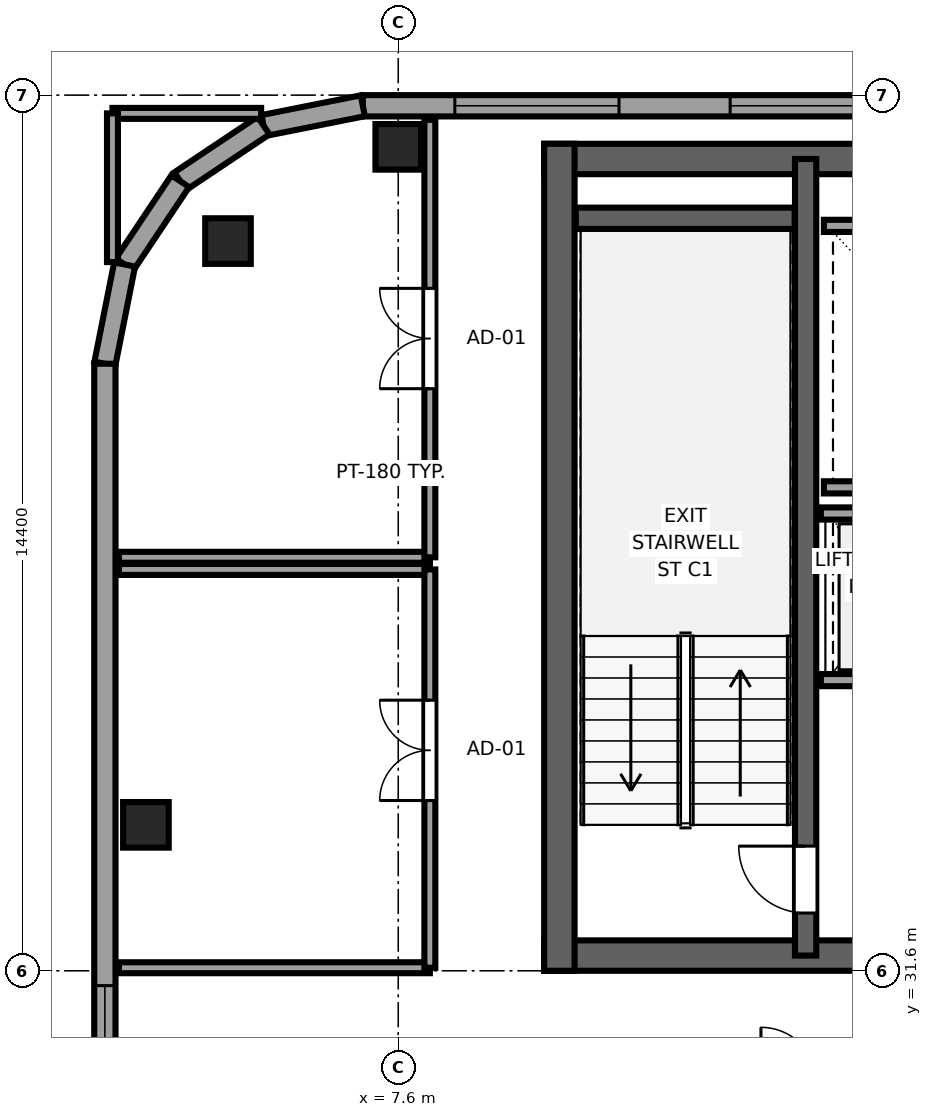
"""IFC4 building model, lengths in metres.
Left out: names, types, materials, properties, quantities, classifications, styles, units other than length and angle.
Written with IfcOpenShell. Run it as: python <this file> out.ifc"""

import sys

from ifc_helpers import new_model, si_unit, direction, frame, frame_2d, origin, origin_2d, place, context, subcontext, project, spatial, rectangle, extrude, source, transform, mapped, element, fill, save


model = new_model("IFC4")
c1 = context("Model", 3, precision=1e-05, world=origin(), true_north=direction((0.0, 1.0)))
c2 = subcontext(c1, "Body", "Model", "MODEL_VIEW")
j1 = project(units=[si_unit("LENGTHUNIT", "METRE"), si_unit("PLANEANGLEUNIT", "RADIAN")], contexts=[c1])
p1 = place(None, origin())
s1 = spatial("IfcSite", under=j1, at=p1, CompositionType="ELEMENT")
p2 = place(p1, origin())
s2 = spatial("IfcBuilding", under=s1, at=p2, CompositionType="ELEMENT")
p3 = place(p2, frame((0.0, 0.0, 209.7)))
s3 = spatial("IfcBuildingStorey", under=s2, at=p3, CompositionType="ELEMENT", Elevation=209.7)
p4 = place(p3, frame((10.0, 31.85, 0.0), z_axis=(0.0, 0.0, 1.0), x_axis=(1.0, 0.0, 0.0)))
e1 = element("IfcWall", 1, at=p4, inside=s3, PredefinedType="SHEAR", context=c2, shape_type="SweptSolid", body=[
    extrude(rectangle(XDim=26.0, YDim=0.5, at=frame_2d((13.0, 0.0))), origin(), (0.0, 0.0, 1.0), 3.55),
])
p5 = place(p4, frame((7.45, 0.0, 0.0), z_axis=(0.0, 0.0, 1.0), x_axis=(-1.0, 0.0, 0.0)))
e2 = element("IfcOpeningElement", 2, at=p5, cuts=e1, PredefinedType="OPENING", context=c2, shape_type="SweptSolid", body=[
    extrude(rectangle(XDim=1.5, YDim=2.04, at=frame_2d((0.75, 1.02))), frame((0.0, 0.26, 0.0), z_axis=(0.0, -1.0, 0.0), x_axis=(1.0, 0.0, 0.0)), (0.0, 0.0, 1.0), 0.52),
])
p6 = place(p4, frame((13.75, 0.0, 0.0), z_axis=(0.0, 0.0, 1.0), x_axis=(-1.0, 0.0, 0.0)))
e3 = element("IfcOpeningElement", 3, at=p6, cuts=e1, PredefinedType="OPENING", context=c2, shape_type="SweptSolid", body=[
    extrude(rectangle(XDim=1.5, YDim=2.04, at=frame_2d((0.75, 1.02))), frame((0.0, 0.26, 0.0), z_axis=(0.0, -1.0, 0.0), x_axis=(1.0, 0.0, 0.0)), (0.0, 0.0, 1.0), 0.52),
])
p7 = place(p4, frame((20.05, 0.0, 0.0), z_axis=(0.0, 0.0, 1.0), x_axis=(-1.0, 0.0, 0.0)))
e4 = element("IfcOpeningElement", 4, at=p7, cuts=e1, PredefinedType="OPENING", context=c2, shape_type="SweptSolid", body=[
    extrude(rectangle(XDim=1.5, YDim=2.04, at=frame_2d((0.75, 1.02))), frame((0.0, 0.26, 0.0), z_axis=(0.0, -1.0, 0.0), x_axis=(1.0, 0.0, 0.0)), (0.0, 0.0, 1.0), 0.52),
])
p8 = place(p3, frame((10.0, 44.95, 0.0), z_axis=(0.0, 0.0, 1.0), x_axis=(1.0, 0.0, 0.0)))
e5 = element("IfcWall", 5, at=p8, inside=s3, PredefinedType="SHEAR", context=c2, shape_type="SweptSolid", body=[
    extrude(rectangle(XDim=26.0, YDim=0.5, at=frame_2d((13.0, 0.0))), origin(), (0.0, 0.0, 1.0), 3.55),
])
p9 = place(p3, frame((10.25, 31.6, 0.0), z_axis=(0.0, 0.0, 1.0), x_axis=(0.0, 1.0, 0.0)))
e6 = element("IfcWall", 6, at=p9, inside=s3, PredefinedType="SHEAR", context=c2, shape_type="SweptSolid", body=[
    extrude(rectangle(XDim=13.6, YDim=0.5, at=frame_2d((6.8, 0.0))), origin(), (0.0, 0.0, 1.0), 3.55),
])
p10 = place(p3, frame((14.3, 31.85, 0.0), z_axis=(0.0, 0.0, 1.0), x_axis=(0.0, 1.0, 0.0)))
e7 = element("IfcWall", 7, at=p10, inside=s3, PredefinedType="SHEAR", context=c2, shape_type="SweptSolid", body=[
    extrude(rectangle(XDim=13.1, YDim=0.35, at=frame_2d((6.55, 0.0))), origin(), (0.0, 0.0, 1.0), 3.55),
])
p11 = place(p10, frame((0.7, 0.0, 0.0)))
e8 = element("IfcOpeningElement", 8, at=p11, cuts=e7, PredefinedType="OPENING", context=c2, shape_type="SweptSolid", body=[
    extrude(rectangle(XDim=1.1, YDim=2.12, at=frame_2d((0.55, 1.06))), frame((0.0, 0.185, 0.0), z_axis=(0.0, -1.0, 0.0), x_axis=(1.0, 0.0, 0.0)), (0.0, 0.0, 1.0), 0.37),
])
p12 = place(p3, frame((10.52, 43.975, 0.0), z_axis=(0.0, 0.0, 1.0), x_axis=(1.0, 0.0, 0.0)))
e9 = element("IfcWall", 9, at=p12, inside=s3, PredefinedType="SHEAR", context=c2, shape_type="SweptSolid", body=[
    extrude(rectangle(XDim=3.6, YDim=0.35, at=frame_2d((1.8, 0.0))), origin(), (0.0, 0.0, 1.0), 3.55),
])
m1 = source(origin(), c2, "Body", "SweptSolid", [
    extrude(rectangle(XDim=0.75, YDim=0.75, at=origin_2d()), origin(), (0.0, 0.0, 1.0), 3.55),
])
for number, where, z_axis, x_axis in (
    (10, (4.8, 43.6, 0.0), (0.0, 0.0, 1.0), (1.0, 0.0, 0.0)),
    (11, (7.6, 45.15, 0.0), (0.0, 0.0, 1.0), (1.0, 0.0, 0.0)),
    (12, (3.45, 34.0, 0.0), (0.0, 0.0, 1.0), (1.0, 0.0, 0.0)),
):
    element("IfcColumn", number, at=place(p3, frame(where, z_axis=z_axis, x_axis=x_axis)), inside=s3, PredefinedType="COLUMN", context=c2, shape_type="MappedRepresentation", body=[
        mapped(m1, transform((0.0, 0.0, 0.0), x_axis=(1.0, 0.0, 0.0), y_axis=(0.0, 1.0, 0.0), z_axis=(0.0, 0.0, 1.0), scale=1.0)),
    ])
p13 = place(p3, frame((35.383, 45.825, 0.0), z_axis=(0.0, 0.0, 1.0), x_axis=(-1.0, 0.0, 0.0)))
e13 = element("IfcWall", 13, at=p13, inside=s3, PredefinedType="SOLIDWALL", context=c2, shape_type="SweptSolid", body=[
    extrude(rectangle(XDim=28.366, YDim=0.35, at=frame_2d((14.183, 0.0))), origin(), (0.0, 0.0, 1.0), 3.37),
])
p14 = place(p13, frame((1.514, 0.0, 0.68)))
e14 = element("IfcOpeningElement", 14, at=p14, cuts=e13, PredefinedType="OPENING", context=c2, shape_type="SweptSolid", body=[
    extrude(rectangle(XDim=2.7, YDim=1.95, at=frame_2d((1.35, 0.975))), frame((0.0, 0.185, 0.0), z_axis=(0.0, -1.0, 0.0), x_axis=(1.0, 0.0, 0.0)), (0.0, 0.0, 1.0), 0.37),
])
p15 = place(p13, frame((6.041, 0.0, 0.68)))
e15 = element("IfcOpeningElement", 15, at=p15, cuts=e13, PredefinedType="OPENING", context=c2, shape_type="SweptSolid", body=[
    extrude(rectangle(XDim=2.7, YDim=1.95, at=frame_2d((1.35, 0.975))), frame((0.0, 0.185, 0.0), z_axis=(0.0, -1.0, 0.0), x_axis=(1.0, 0.0, 0.0)), (0.0, 0.0, 1.0), 0.37),
])
p16 = place(p13, frame((10.569, 0.0, 0.68)))
e16 = element("IfcOpeningElement", 16, at=p16, cuts=e13, PredefinedType="OPENING", context=c2, shape_type="SweptSolid", body=[
    extrude(rectangle(XDim=2.7, YDim=1.95, at=frame_2d((1.35, 0.975))), frame((0.0, 0.185, 0.0), z_axis=(0.0, -1.0, 0.0), x_axis=(1.0, 0.0, 0.0)), (0.0, 0.0, 1.0), 0.37),
])
p17 = place(p13, frame((15.097, 0.0, 0.68)))
e17 = element("IfcOpeningElement", 17, at=p17, cuts=e13, PredefinedType="OPENING", context=c2, shape_type="SweptSolid", body=[
    extrude(rectangle(XDim=2.7, YDim=1.95, at=frame_2d((1.35, 0.975))), frame((0.0, 0.185, 0.0), z_axis=(0.0, -1.0, 0.0), x_axis=(1.0, 0.0, 0.0)), (0.0, 0.0, 1.0), 0.37),
])
p18 = place(p13, frame((19.624, 0.0, 0.68)))
e18 = element("IfcOpeningElement", 18, at=p18, cuts=e13, PredefinedType="OPENING", context=c2, shape_type="SweptSolid", body=[
    extrude(rectangle(XDim=2.7, YDim=1.95, at=frame_2d((1.35, 0.975))), frame((0.0, 0.185, 0.0), z_axis=(0.0, -1.0, 0.0), x_axis=(1.0, 0.0, 0.0)), (0.0, 0.0, 1.0), 0.37),
])
p19 = place(p13, frame((24.152, 0.0, 0.68)))
e19 = element("IfcOpeningElement", 19, at=p19, cuts=e13, PredefinedType="OPENING", context=c2, shape_type="SweptSolid", body=[
    extrude(rectangle(XDim=2.7, YDim=1.95, at=frame_2d((1.35, 0.975))), frame((0.0, 0.185, 0.0), z_axis=(0.0, -1.0, 0.0), x_axis=(1.0, 0.0, 0.0)), (0.0, 0.0, 1.0), 0.37),
])
p20 = place(p3, frame((7.017, 45.825, 0.0), z_axis=(0.0, 0.0, 1.0), x_axis=(-0.980788844421, -0.195072403631, 0.0)))
e20 = element("IfcWall", 20, at=p20, inside=s3, PredefinedType="SOLIDWALL", context=c2, shape_type="SweptSolid", body=[
    extrude(rectangle(XDim=1.665, YDim=0.35, at=frame_2d((0.832, 0.0))), origin(), (0.0, 0.0, 1.0), 3.37),
])
for number, where, z_axis, x_axis in (
    (21, (5.385, 45.5, 0.0), (0.0, 0.0, 1.0), (-0.832, -0.556, 0.0)),
    (22, (4.015, 44.585, 0.0), (0.0, 0.0, 1.0), (-0.556, -0.831, 0.0)),
):
    element("IfcWall", number, at=place(p3, frame(where, z_axis=z_axis, x_axis=x_axis)), inside=s3, PredefinedType="SOLIDWALL", context=c2, shape_type="SweptSolid", body=[
        extrude(rectangle(XDim=1.647, YDim=0.35, at=frame_2d((0.824, 0.0))), origin(), (0.0, 0.0, 1.0), 2.9),
    ])
p21 = place(p3, frame((3.1, 43.216, 0.0), z_axis=(0.0, 0.0, 1.0), x_axis=(-0.195044345786, -0.980794424524, 0.0)))
e23 = element("IfcWall", 23, at=p21, inside=s3, PredefinedType="SOLIDWALL", context=c2, shape_type="SweptSolid", body=[
    extrude(rectangle(XDim=1.665, YDim=0.35, at=frame_2d((0.833, 0.0))), origin(), (0.0, 0.0, 1.0), 3.37),
])
p22 = place(p3, frame((2.775, 41.583, 0.0), z_axis=(0.0, 0.0, 1.0), x_axis=(0.0, -1.0, 0.0)))
e24 = element("IfcWall", 24, at=p22, inside=s3, PredefinedType="SOLIDWALL", context=c2, shape_type="SweptSolid", body=[
    extrude(rectangle(XDim=34.566, YDim=0.35, at=frame_2d((17.283, 0.0))), origin(), (0.0, 0.0, 1.0), 3.37),
])
p23 = place(p22, frame((10.227, 0.0, 0.68)))
e25 = element("IfcOpeningElement", 25, at=p23, cuts=e24, PredefinedType="OPENING", context=c2, shape_type="SweptSolid", body=[
    extrude(rectangle(XDim=2.7, YDim=1.95, at=frame_2d((1.35, 0.975))), frame((0.0, 0.185, 0.0), z_axis=(0.0, -1.0, 0.0), x_axis=(1.0, 0.0, 0.0)), (0.0, 0.0, 1.0), 0.37),
])
p24 = place(p22, frame((22.189, 0.0, 0.68)))
e26 = element("IfcOpeningElement", 26, at=p24, cuts=e24, PredefinedType="OPENING", context=c2, shape_type="SweptSolid", body=[
    extrude(rectangle(XDim=2.7, YDim=1.95, at=frame_2d((1.35, 0.975))), frame((0.0, 0.185, 0.0), z_axis=(0.0, -1.0, 0.0), x_axis=(1.0, 0.0, 0.0)), (0.0, 0.0, 1.0), 0.37),
])
p25 = place(p22, frame((26.36, 0.0, 0.68)))
e27 = element("IfcOpeningElement", 27, at=p25, cuts=e24, PredefinedType="OPENING", context=c2, shape_type="SweptSolid", body=[
    extrude(rectangle(XDim=2.7, YDim=1.95, at=frame_2d((1.35, 0.975))), frame((0.0, 0.185, 0.0), z_axis=(0.0, -1.0, 0.0), x_axis=(1.0, 0.0, 0.0)), (0.0, 0.0, 1.0), 0.37),
])
p26 = place(p22, frame((29.48, 0.0, 0.68)))
e28 = element("IfcOpeningElement", 28, at=p26, cuts=e24, PredefinedType="OPENING", context=c2, shape_type="SweptSolid", body=[
    extrude(rectangle(XDim=2.7, YDim=1.95, at=frame_2d((1.35, 0.975))), frame((0.0, 0.185, 0.0), z_axis=(0.0, -1.0, 0.0), x_axis=(1.0, 0.0, 0.0)), (0.0, 0.0, 1.0), 0.37),
])
p27 = place(p22, frame((16.683, 0.0, 0.62)))
e29 = element("IfcOpeningElement", 29, at=p27, cuts=e24, PredefinedType="OPENING", context=c2, shape_type="SweptSolid", body=[
    extrude(rectangle(XDim=1.5, YDim=1.55, at=frame_2d((0.75, 0.775))), frame((0.0, 0.185, 0.0), z_axis=(0.0, -1.0, 0.0), x_axis=(1.0, 0.0, 0.0)), (0.0, 0.0, 1.0), 0.37),
])
for number, where, z_axis, x_axis in (
    (30, (14.6, 39.55, 0.0), (0.0, 0.0, 1.0), (1.0, 0.0, 0.0)),
    (31, (14.6, 43.85, 0.0), (0.0, 0.0, 1.0), (1.0, 0.0, 0.0)),
):
    element("IfcWall", number, at=place(p3, frame(where, z_axis=z_axis, x_axis=x_axis)), inside=s3, PredefinedType="SOLIDWALL", context=c2, shape_type="SweptSolid", body=[
        extrude(rectangle(XDim=4.1, YDim=0.2, at=frame_2d((2.05, 0.0))), origin(), (0.0, 0.0, 1.0), 3.37),
    ])
p28 = place(p3, frame((14.55, 36.38, 0.0), z_axis=(0.0, 0.0, 1.0), x_axis=(1.0, 0.0, 0.0)))
e32 = element("IfcWall", 32, at=p28, inside=s3, PredefinedType="SOLIDWALL", context=c2, shape_type="SweptSolid", body=[
    extrude(rectangle(XDim=4.075, YDim=0.2, at=frame_2d((2.038, 0.0))), origin(), (0.0, 0.0, 1.0), 3.37),
])
p29 = place(p28, frame((0.55, 0.0, 0.0)))
e33 = element("IfcOpeningElement", 33, at=p29, cuts=e32, PredefinedType="OPENING", context=c2, shape_type="SweptSolid", body=[
    extrude(rectangle(XDim=1.1, YDim=2.12, at=frame_2d((0.55, 1.06))), frame((0.0, 0.11, 0.0), z_axis=(0.0, -1.0, 0.0), x_axis=(1.0, 0.0, 0.0)), (0.0, 0.0, 1.0), 0.22),
])
p30 = place(p28, frame((2.45, 0.0, 0.0)))
e34 = element("IfcOpeningElement", 34, at=p30, cuts=e32, PredefinedType="OPENING", context=c2, shape_type="SweptSolid", body=[
    extrude(rectangle(XDim=1.1, YDim=2.12, at=frame_2d((0.55, 1.06))), frame((0.0, 0.11, 0.0), z_axis=(0.0, -1.0, 0.0), x_axis=(1.0, 0.0, 0.0)), (0.0, 0.0, 1.0), 0.22),
])
p31 = place(p3, frame((14.55, 39.12, 0.0), z_axis=(0.0, 0.0, 1.0), x_axis=(1.0, 0.0, 0.0)))
e35 = element("IfcWall", 35, at=p31, inside=s3, PredefinedType="SOLIDWALL", context=c2, shape_type="SweptSolid", body=[
    extrude(rectangle(XDim=4.075, YDim=0.2, at=frame_2d((2.038, 0.0))), origin(), (0.0, 0.0, 1.0), 3.37),
])
for number, where, z_axis, x_axis in (
    (36, (3.005, 31.65, 0.0), (0.0, 0.0, 1.0), (1.0, 0.0, 0.0)),
    (37, (3.005, 38.2, 0.0), (0.0, 0.0, 1.0), (1.0, 0.0, 0.0)),
):
    element("IfcWall", number, at=place(p3, frame(where, z_axis=z_axis, x_axis=x_axis)), inside=s3, PredefinedType="PARTITIONING", context=c2, shape_type="SweptSolid", body=[
        extrude(rectangle(XDim=5.115, YDim=0.18, at=frame_2d((2.558, 0.0))), origin(), (0.0, 0.0, 1.0), 3.37),
    ])
p32 = place(p3, frame((8.12, 31.65, 0.0), z_axis=(0.0, 0.0, 1.0), x_axis=(0.0, 1.0, 0.0)))
e38 = element("IfcWall", 38, at=p32, inside=s3, PredefinedType="PARTITIONING", context=c2, shape_type="SweptSolid", body=[
    extrude(rectangle(XDim=6.55, YDim=0.18, at=frame_2d((3.275, 0.0))), origin(), (0.0, 0.0, 1.0), 3.37),
])
p33 = place(p32, frame((2.75, 0.0, 0.0)))
e39 = element("IfcOpeningElement", 39, at=p33, cuts=e38, PredefinedType="OPENING", context=c2, shape_type="SweptSolid", body=[
    extrude(rectangle(XDim=1.65, YDim=2.15, at=frame_2d((0.825, 1.075))), frame((0.0, 0.1, 0.0), z_axis=(0.0, -1.0, 0.0), x_axis=(1.0, 0.0, 0.0)), (0.0, 0.0, 1.0), 0.2),
])
p34 = place(p3, frame((3.005, 38.4, 0.0), z_axis=(0.0, 0.0, 1.0), x_axis=(1.0, 0.0, 0.0)))
e40 = element("IfcWall", 40, at=p34, inside=s3, PredefinedType="PARTITIONING", context=c2, shape_type="SweptSolid", body=[
    extrude(rectangle(XDim=5.115, YDim=0.18, at=frame_2d((2.558, 0.0))), origin(), (0.0, 0.0, 1.0), 3.37),
])
for number, where, z_axis, x_axis in (
    (41, (2.9, 45.7, 0.0), (0.0, 0.0, 1.0), (1.0, 0.0, 0.0)),
    (42, (2.9, 43.255, 0.0), (0.0, 0.0, 1.0), (0.0, 1.0, 0.0)),
):
    element("IfcWall", number, at=place(p3, frame(where, z_axis=z_axis, x_axis=x_axis)), inside=s3, PredefinedType="PARTITIONING", context=c2, shape_type="SweptSolid", body=[
        extrude(rectangle(XDim=2.445, YDim=0.18, at=frame_2d((1.223, 0.0))), origin(), (0.0, 0.0, 1.0), 3.37),
    ])
p35 = place(p3, frame((8.12, 38.4, 0.0), z_axis=(0.0, 0.0, 1.0), x_axis=(0.0, 1.0, 0.0)))
e43 = element("IfcWall", 43, at=p35, inside=s3, PredefinedType="PARTITIONING", context=c2, shape_type="SweptSolid", body=[
    extrude(rectangle(XDim=7.195, YDim=0.18, at=frame_2d((3.598, 0.0))), origin(), (0.0, 0.0, 1.0), 3.37),
])
p36 = place(p35, frame((2.772, 0.0, 0.0)))
e44 = element("IfcOpeningElement", 44, at=p36, cuts=e43, PredefinedType="OPENING", context=c2, shape_type="SweptSolid", body=[
    extrude(rectangle(XDim=1.65, YDim=2.15, at=frame_2d((0.825, 1.075))), frame((0.0, 0.1, 0.0), z_axis=(0.0, -1.0, 0.0), x_axis=(1.0, 0.0, 0.0)), (0.0, 0.0, 1.0), 0.2),
])
m2 = source(origin(), c2, "Body", "SweptSolid", [
    extrude(rectangle(XDim=2.7, YDim=1.95, at=frame_2d((1.35, 0.975))), frame((0.0, 0.09, 0.0), z_axis=(0.0, -1.0, 0.0), x_axis=(1.0, 0.0, 0.0)), (0.0, 0.0, 1.0), 0.06),
])
p37 = place(p18, origin())
e45 = element("IfcWindow", 45, at=p37, inside=s3, PartitioningType="TRIPLE_PANEL_HORIZONTAL", PredefinedType="WINDOW", context=c2, shape_type="MappedRepresentation", body=[
    mapped(m2, transform((0.0, 0.0, 0.0), x_axis=(1.0, 0.0, 0.0), y_axis=(0.0, 1.0, 0.0), z_axis=(0.0, 0.0, 1.0), scale=1.0)),
])
fill(e18, e45)
p38 = place(p19, origin())
e46 = element("IfcWindow", 46, at=p38, inside=s3, PartitioningType="TRIPLE_PANEL_HORIZONTAL", PredefinedType="WINDOW", context=c2, shape_type="MappedRepresentation", body=[
    mapped(m2, transform((0.0, 0.0, 0.0), x_axis=(1.0, 0.0, 0.0), y_axis=(0.0, 1.0, 0.0), z_axis=(0.0, 0.0, 1.0), scale=1.0)),
])
fill(e19, e46)
p39 = place(p23, origin())
e47 = element("IfcWindow", 47, at=p39, inside=s3, PartitioningType="TRIPLE_PANEL_HORIZONTAL", PredefinedType="WINDOW", context=c2, shape_type="MappedRepresentation", body=[
    mapped(m2, transform((0.0, 0.0, 0.0), x_axis=(1.0, 0.0, 0.0), y_axis=(0.0, 1.0, 0.0), z_axis=(0.0, 0.0, 1.0), scale=1.0)),
])
fill(e25, e47)
m3 = source(origin(), c2, "Body", "SweptSolid", [
    extrude(rectangle(XDim=1.1, YDim=2.12, at=frame_2d((0.55, 1.06))), frame((0.0, 0.025, 0.0), z_axis=(0.0, -1.0, 0.0), x_axis=(1.0, 0.0, 0.0)), (0.0, 0.0, 1.0), 0.05),
])
p40 = place(p11, origin())
e48 = element("IfcDoor", 48, at=p40, inside=s3, OperationType="SINGLE_SWING_RIGHT", PredefinedType="DOOR", context=c2, shape_type="MappedRepresentation", body=[
    mapped(m3, transform((0.0, 0.0, 0.0), x_axis=(1.0, 0.0, 0.0), y_axis=(0.0, 1.0, 0.0), z_axis=(0.0, 0.0, 1.0), scale=1.0)),
])
fill(e8, e48)
m4 = source(origin(), c2, "Body", "SweptSolid", [
    extrude(rectangle(XDim=1.65, YDim=2.15, at=frame_2d((0.825, 1.075))), frame((0.0, 0.025, 0.0), z_axis=(0.0, -1.0, 0.0), x_axis=(1.0, 0.0, 0.0)), (0.0, 0.0, 1.0), 0.05),
])
p41 = place(p33, origin())
e49 = element("IfcDoor", 49, at=p41, inside=s3, OperationType="DOUBLE_DOOR_SINGLE_SWING", PredefinedType="DOOR", context=c2, shape_type="MappedRepresentation", body=[
    mapped(m4, transform((0.0, 0.0, 0.0), x_axis=(1.0, 0.0, 0.0), y_axis=(0.0, 1.0, 0.0), z_axis=(0.0, 0.0, 1.0), scale=1.0)),
])
fill(e39, e49)
p42 = place(p36, origin())
e50 = element("IfcDoor", 50, at=p42, inside=s3, OperationType="DOUBLE_DOOR_SINGLE_SWING", PredefinedType="DOOR", context=c2, shape_type="MappedRepresentation", body=[
    mapped(m4, transform((0.0, 0.0, 0.0), x_axis=(1.0, 0.0, 0.0), y_axis=(0.0, 1.0, 0.0), z_axis=(0.0, 0.0, 1.0), scale=1.0)),
])
fill(e44, e50)
save(model, sys.argv[1])
